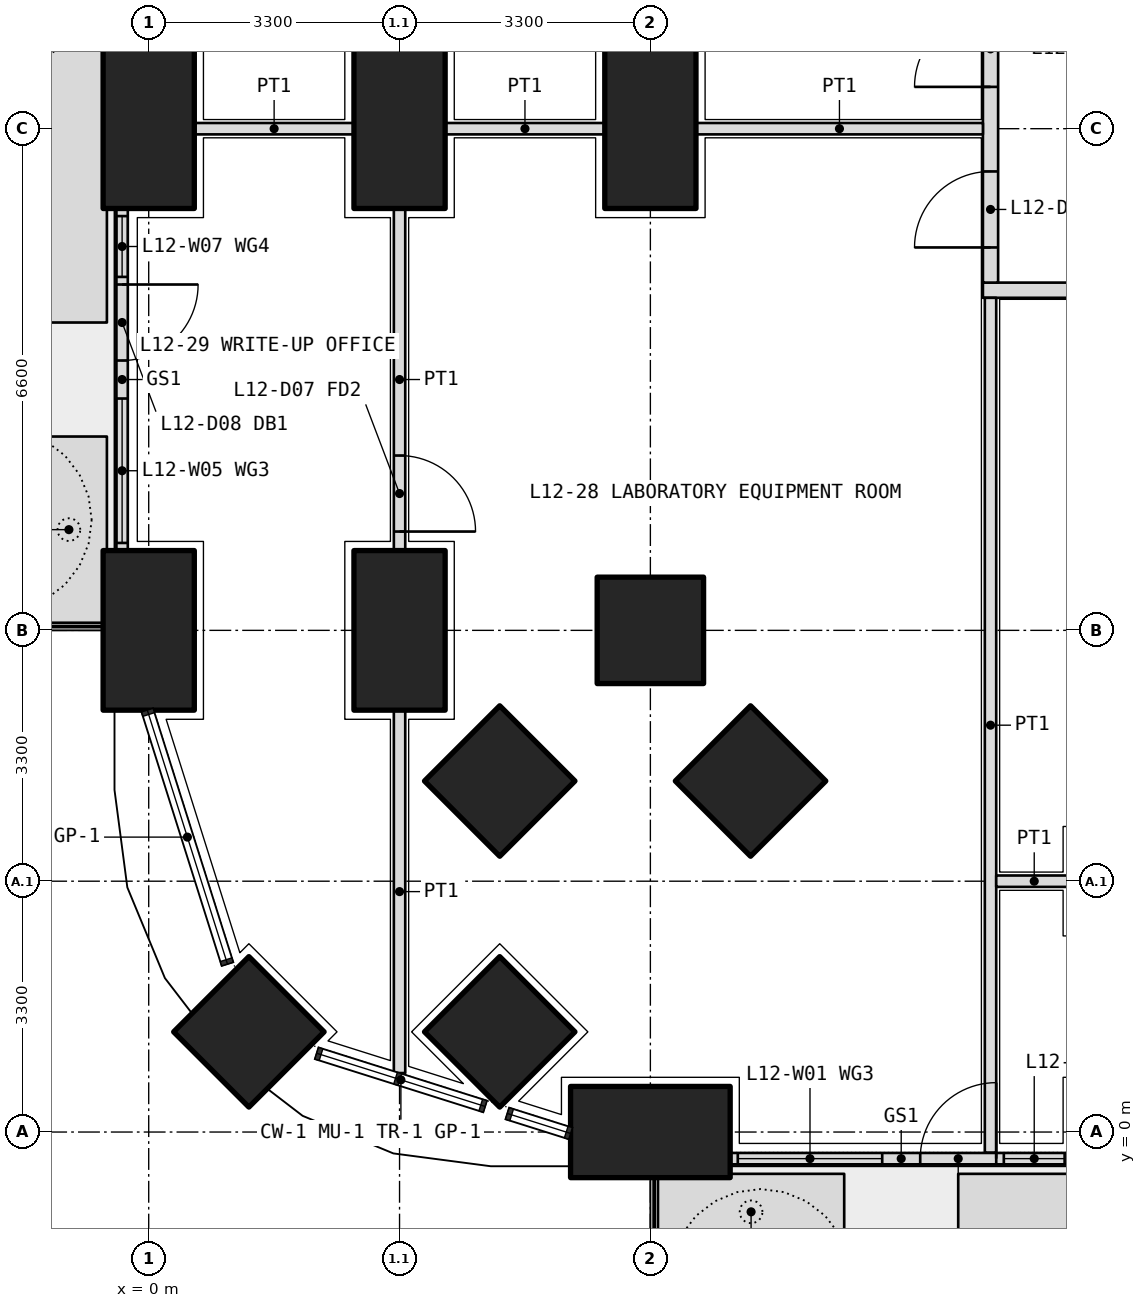
"""IFC4 building model, lengths in metres.
Left out: names, types, materials, properties, quantities, classifications, styles, units other than length and angle.
Written with IfcOpenShell. Run it as: python <this file> out.ifc"""

import sys

from ifc_helpers import new_model, si_unit, direction, frame, frame_2d, origin, origin_2d, place, context, subcontext, project, spatial, polyline, rectangle, outline, extrude, element, fill, save


model = new_model("IFC4")
c1 = context("Model", 3, precision=1e-05, world=origin(), true_north=direction((0.0, 1.0)))
c2 = subcontext(c1, "Body", "Model", "MODEL_VIEW")
j1 = project(units=[si_unit("LENGTHUNIT", "METRE"), si_unit("PLANEANGLEUNIT", "RADIAN")], contexts=[c1])
p1 = place(None, origin())
s1 = spatial("IfcSite", under=j1, at=p1, CompositionType="ELEMENT")
p2 = place(p1, origin())
s2 = spatial("IfcBuilding", under=s1, at=p2, CompositionType="ELEMENT")
p3 = place(p2, frame((0.0, 0.0, 54.9)))
s3 = spatial("IfcBuildingStorey", under=s2, at=p3, CompositionType="ELEMENT", Elevation=54.9)
p4 = place(p3, frame((1.318, 1.318, 0.0), z_axis=(0.0, 0.0, 1.0), x_axis=(0.707106781187, 0.707106781187, 0.0)))
e1 = element("IfcColumn", 1, at=p4, inside=s3, PredefinedType="COLUMN", context=c2, shape_type="SweptSolid", body=[
    extrude(rectangle(XDim=1.4, YDim=1.4, at=origin_2d()), origin(), (0.0, 0.0, 1.0), 4.2),
])
for number, where, z_axis, x_axis in (
    (2, (6.6, 0.0, 0.0), (0.0, 0.0, 1.0), (1.0, 0.0, 0.0)),
    (3, (0.0, 6.6, 0.0), (0.0, 0.0, 1.0), (0.0, 1.0, 0.0)),
    (4, (0.0, 13.2, 0.0), (0.0, 0.0, 1.0), (0.0, 1.0, 0.0)),
):
    element("IfcColumn", number, at=place(p3, frame(where, z_axis=z_axis, x_axis=x_axis)), inside=s3, PredefinedType="COLUMN", context=c2, shape_type="SweptSolid", body=[
        extrude(rectangle(XDim=2.1, YDim=1.2, at=origin_2d()), origin(), (0.0, 0.0, 1.0), 4.2),
    ])
for number, where, z_axis, x_axis in (
    (5, (6.6, 6.6, 0.0), (0.0, 0.0, 1.0), (1.0, 0.0, 0.0)),
    (6, (4.618, 1.318, 0.0), (0.0, 0.0, 1.0), (0.707, 0.707, 0.0)),
):
    element("IfcColumn", number, at=place(p3, frame(where, z_axis=z_axis, x_axis=x_axis)), inside=s3, PredefinedType="COLUMN", context=c2, shape_type="SweptSolid", body=[
        extrude(rectangle(XDim=1.4, YDim=1.4, at=origin_2d()), origin(), (0.0, 0.0, 1.0), 4.2),
    ])
for number, where, z_axis, x_axis in (
    (7, (3.3, 6.6, 0.0), (0.0, 0.0, 1.0), (0.0, 1.0, 0.0)),
    (8, (3.3, 13.2, 0.0), (0.0, 0.0, 1.0), (0.0, 1.0, 0.0)),
):
    element("IfcColumn", number, at=place(p3, frame(where, z_axis=z_axis, x_axis=x_axis)), inside=s3, PredefinedType="COLUMN", context=c2, shape_type="SweptSolid", body=[
        extrude(rectangle(XDim=2.1, YDim=1.2, at=origin_2d()), origin(), (0.0, 0.0, 1.0), 4.2),
    ])
for number, where, z_axis, x_axis in (
    (9, (4.618, 4.618, 0.0), (0.0, 0.0, 1.0), (0.707, 0.707, 0.0)),
    (10, (7.918, 4.618, 0.0), (0.0, 0.0, 1.0), (0.707, 0.707, 0.0)),
):
    element("IfcColumn", number, at=place(p3, frame(where, z_axis=z_axis, x_axis=x_axis)), inside=s3, PredefinedType="COLUMN", context=c2, shape_type="SweptSolid", body=[
        extrude(rectangle(XDim=1.4, YDim=1.4, at=origin_2d()), origin(), (0.0, 0.0, 1.0), 4.2),
    ])
p5 = place(p3, frame((6.6, 13.2, 0.0), z_axis=(0.0, 0.0, 1.0), x_axis=(0.0, 1.0, 0.0)))
e11 = element("IfcColumn", 11, at=p5, inside=s3, PredefinedType="COLUMN", context=c2, shape_type="SweptSolid", body=[
    extrude(rectangle(XDim=2.1, YDim=1.2, at=origin_2d()), origin(), (0.0, 0.0, 1.0), 4.2),
])
p6 = place(p3, origin())
e12 = element("IfcWall", 12, at=p6, inside=s3, PredefinedType="USERDEFINED", context=c2, shape_type="SweptSolid", body=[
    extrude(outline(polyline([(6.7, -1.55), (9.15, -1.55), (9.15, -0.55), (6.7, -0.55), (6.7, -1.55)]), holes=[polyline([(6.85, -1.4), (9.0, -1.4), (9.0, -0.7), (6.85, -0.7), (6.85, -1.4)])]), origin(), (0.0, 0.0, 1.0), 1.05),
])
p7 = place(p3, origin())
e13 = element("IfcWall", 13, at=p7, inside=s3, PredefinedType="USERDEFINED", context=c2, shape_type="SweptSolid", body=[
    extrude(outline(polyline([(10.65, -1.55), (19.7, -1.55), (19.7, -0.55), (10.65, -0.55), (10.65, -1.55)]), holes=[polyline([(10.8, -1.4), (19.55, -1.4), (19.55, -0.7), (10.8, -0.7), (10.8, -1.4)])]), origin(), (0.0, 0.0, 1.0), 1.05),
])
p8 = place(p3, origin())
e14 = element("IfcWall", 14, at=p8, inside=s3, PredefinedType="USERDEFINED", context=c2, shape_type="SweptSolid", body=[
    extrude(outline(polyline([(-1.55, 6.7), (-0.55, 6.7), (-0.55, 9.15), (-1.55, 9.15), (-1.55, 6.7)]), holes=[polyline([(-1.4, 6.85), (-0.7, 6.85), (-0.7, 9.0), (-1.4, 9.0), (-1.4, 6.85)])]), origin(), (0.0, 0.0, 1.0), 1.05),
])
p9 = place(p3, origin())
e15 = element("IfcWall", 15, at=p9, inside=s3, PredefinedType="USERDEFINED", context=c2, shape_type="SweptSolid", body=[
    extrude(outline(polyline([(-1.55, 10.65), (-0.55, 10.65), (-0.55, 19.7), (-1.55, 19.7), (-1.55, 10.65)]), holes=[polyline([(-1.4, 10.8), (-0.7, 10.8), (-0.7, 19.55), (-1.4, 19.55), (-1.4, 10.8)])]), origin(), (0.0, 0.0, 1.0), 1.05),
])
p10 = place(p3, frame((7.65, -0.35, 0.0), z_axis=(0.0, 0.0, 1.0), x_axis=(1.0, 0.0, 0.0)))
e16 = element("IfcWall", 16, at=p10, inside=s3, PredefinedType="SOLIDWALL", context=c2, shape_type="SweptSolid", body=[
    extrude(rectangle(XDim=4.5, YDim=0.15, at=frame_2d((2.25, 0.0))), origin(), (0.0, 0.0, 1.0), 2.7),
])
p11 = place(p10, frame((2.5, 0.0, 0.0)))
e17 = element("IfcOpeningElement", 17, at=p11, cuts=e16, PredefinedType="OPENING", context=c2, shape_type="SweptSolid", body=[
    extrude(rectangle(XDim=1.0, YDim=2.4, at=frame_2d((0.5, 1.2))), frame((0.0, 0.085, 0.0), z_axis=(0.0, -1.0, 0.0), x_axis=(1.0, 0.0, 0.0)), (0.0, 0.0, 1.0), 0.17),
])
p12 = place(p10, frame((0.1, 0.0, 0.1)))
e18 = element("IfcOpeningElement", 18, at=p12, cuts=e16, PredefinedType="OPENING", context=c2, shape_type="SweptSolid", body=[
    extrude(rectangle(XDim=1.9, YDim=2.3, at=frame_2d((0.95, 1.15))), frame((0.0, 0.085, 0.0), z_axis=(0.0, -1.0, 0.0), x_axis=(1.0, 0.0, 0.0)), (0.0, 0.0, 1.0), 0.17),
])
p13 = place(p10, frame((3.6, 0.0, 0.1)))
e19 = element("IfcOpeningElement", 19, at=p13, cuts=e16, PredefinedType="OPENING", context=c2, shape_type="SweptSolid", body=[
    extrude(rectangle(XDim=0.8, YDim=2.3, at=frame_2d((0.4, 1.15))), frame((0.0, 0.085, 0.0), z_axis=(0.0, -1.0, 0.0), x_axis=(1.0, 0.0, 0.0)), (0.0, 0.0, 1.0), 0.17),
])
p14 = place(p3, frame((-0.35, 12.15, 0.0), z_axis=(0.0, 0.0, 1.0), x_axis=(0.0, -1.0, 0.0)))
e20 = element("IfcWall", 20, at=p14, inside=s3, PredefinedType="SOLIDWALL", context=c2, shape_type="SweptSolid", body=[
    extrude(rectangle(XDim=4.5, YDim=0.15, at=frame_2d((2.25, 0.0))), origin(), (0.0, 0.0, 1.0), 2.7),
])
p15 = place(p14, frame((1.0, 0.0, 0.0)))
e21 = element("IfcOpeningElement", 21, at=p15, cuts=e20, PredefinedType="OPENING", context=c2, shape_type="SweptSolid", body=[
    extrude(rectangle(XDim=1.0, YDim=2.4, at=frame_2d((0.5, 1.2))), frame((0.0, 0.085, 0.0), z_axis=(0.0, -1.0, 0.0), x_axis=(1.0, 0.0, 0.0)), (0.0, 0.0, 1.0), 0.17),
])
p16 = place(p14, frame((0.1, 0.0, 0.1)))
e22 = element("IfcOpeningElement", 22, at=p16, cuts=e20, PredefinedType="OPENING", context=c2, shape_type="SweptSolid", body=[
    extrude(rectangle(XDim=0.8, YDim=2.3, at=frame_2d((0.4, 1.15))), frame((0.0, 0.085, 0.0), z_axis=(0.0, -1.0, 0.0), x_axis=(1.0, 0.0, 0.0)), (0.0, 0.0, 1.0), 0.17),
])
p17 = place(p14, frame((2.5, 0.0, 0.1)))
e23 = element("IfcOpeningElement", 23, at=p17, cuts=e20, PredefinedType="OPENING", context=c2, shape_type="SweptSolid", body=[
    extrude(rectangle(XDim=1.9, YDim=2.3, at=frame_2d((0.95, 1.15))), frame((0.0, 0.085, 0.0), z_axis=(0.0, -1.0, 0.0), x_axis=(1.0, 0.0, 0.0)), (0.0, 0.0, 1.0), 0.17),
])
p18 = place(p3, frame((10.975, 11.075, 0.0), z_axis=(0.0, 0.0, 1.0), x_axis=(1.0, 0.0, 0.0)))
e24 = element("IfcWall", 24, at=p18, inside=s3, PredefinedType="PARTITIONING", context=c2, shape_type="SweptSolid", body=[
    extrude(rectangle(XDim=12.125, YDim=0.2, at=frame_2d((6.062, 0.0))), origin(), (0.0, 0.0, 1.0), 2.85),
])
p19 = place(p18, frame((5.613, 0.0, 0.0)))
e25 = element("IfcOpeningElement", 25, at=p19, cuts=e24, PredefinedType="OPENING", context=c2, shape_type="SweptSolid", body=[
    extrude(rectangle(XDim=1.0, YDim=2.1, at=frame_2d((0.5, 1.05))), frame((0.0, 0.11, 0.0), z_axis=(0.0, -1.0, 0.0), x_axis=(1.0, 0.0, 0.0)), (0.0, 0.0, 1.0), 0.22),
])
p20 = place(p3, frame((11.075, 11.175, 0.0), z_axis=(0.0, 0.0, 1.0), x_axis=(0.0, 1.0, 0.0)))
e26 = element("IfcWall", 26, at=p20, inside=s3, PredefinedType="PARTITIONING", context=c2, shape_type="SweptSolid", body=[
    extrude(rectangle(XDim=23.85, YDim=0.2, at=frame_2d((11.925, 0.0))), origin(), (0.0, 0.0, 1.0), 2.85),
])
p21 = place(p20, frame((0.462, 0.0, 0.0)))
e27 = element("IfcOpeningElement", 27, at=p21, cuts=e26, PredefinedType="OPENING", context=c2, shape_type="SweptSolid", body=[
    extrude(rectangle(XDim=1.0, YDim=2.1, at=frame_2d((0.5, 1.05))), frame((0.0, 0.11, 0.0), z_axis=(0.0, -1.0, 0.0), x_axis=(1.0, 0.0, 0.0)), (0.0, 0.0, 1.0), 0.22),
])
p22 = place(p20, frame((2.575, 0.0, 0.0)))
e28 = element("IfcOpeningElement", 28, at=p22, cuts=e26, PredefinedType="OPENING", context=c2, shape_type="SweptSolid", body=[
    extrude(rectangle(XDim=1.0, YDim=2.1, at=frame_2d((0.5, 1.05))), frame((0.0, 0.11, 0.0), z_axis=(0.0, -1.0, 0.0), x_axis=(1.0, 0.0, 0.0)), (0.0, 0.0, 1.0), 0.22),
])
p23 = place(p20, frame((5.625, 0.0, 0.0)))
e29 = element("IfcOpeningElement", 29, at=p23, cuts=e26, PredefinedType="OPENING", context=c2, shape_type="SweptSolid", body=[
    extrude(rectangle(XDim=0.9, YDim=2.1, at=frame_2d((0.45, 1.05))), frame((0.0, 0.11, 0.0), z_axis=(0.0, -1.0, 0.0), x_axis=(1.0, 0.0, 0.0)), (0.0, 0.0, 1.0), 0.22),
])
p24 = place(p20, frame((9.425, 0.0, 0.0)))
e30 = element("IfcOpeningElement", 30, at=p24, cuts=e26, PredefinedType="OPENING", context=c2, shape_type="SweptSolid", body=[
    extrude(rectangle(XDim=0.9, YDim=2.1, at=frame_2d((0.45, 1.05))), frame((0.0, 0.11, 0.0), z_axis=(0.0, -1.0, 0.0), x_axis=(1.0, 0.0, 0.0)), (0.0, 0.0, 1.0), 0.22),
])
p25 = place(p20, frame((12.975, 0.0, 0.0)))
e31 = element("IfcOpeningElement", 31, at=p25, cuts=e26, PredefinedType="OPENING", context=c2, shape_type="SweptSolid", body=[
    extrude(rectangle(XDim=1.0, YDim=2.1, at=frame_2d((0.5, 1.05))), frame((0.0, 0.11, 0.0), z_axis=(0.0, -1.0, 0.0), x_axis=(1.0, 0.0, 0.0)), (0.0, 0.0, 1.0), 0.22),
])
p26 = place(p20, frame((18.025, 0.0, 0.0)))
e32 = element("IfcOpeningElement", 32, at=p26, cuts=e26, PredefinedType="OPENING", context=c2, shape_type="SweptSolid", body=[
    extrude(rectangle(XDim=1.0, YDim=2.1, at=frame_2d((0.5, 1.05))), frame((0.0, 0.11, 0.0), z_axis=(0.0, -1.0, 0.0), x_axis=(1.0, 0.0, 0.0)), (0.0, 0.0, 1.0), 0.22),
])
p27 = place(p20, frame((22.387, 0.0, 0.0)))
e33 = element("IfcOpeningElement", 33, at=p27, cuts=e26, PredefinedType="OPENING", context=c2, shape_type="SweptSolid", body=[
    extrude(rectangle(XDim=1.0, YDim=2.1, at=frame_2d((0.5, 1.05))), frame((0.0, 0.11, 0.0), z_axis=(0.0, -1.0, 0.0), x_axis=(1.0, 0.0, 0.0)), (0.0, 0.0, 1.0), 0.22),
])
p28 = place(p3, frame((11.075, -0.27, 0.0), z_axis=(0.0, 0.0, 1.0), x_axis=(0.0, 1.0, 0.0)))
e34 = element("IfcWall", 34, at=p28, inside=s3, PredefinedType="PARTITIONING", context=c2, shape_type="SweptSolid", body=[
    extrude(rectangle(XDim=11.245, YDim=0.15, at=frame_2d((5.623, 0.0))), origin(), (0.0, 0.0, 1.0), 2.7),
])
p29 = place(p3, frame((11.15, 3.3, 0.0), z_axis=(0.0, 0.0, 1.0), x_axis=(1.0, 0.0, 0.0)))
e35 = element("IfcWall", 35, at=p29, inside=s3, PredefinedType="PARTITIONING", context=c2, shape_type="SweptSolid", body=[
    extrude(rectangle(XDim=1.0, YDim=0.15, at=frame_2d((0.5, 0.0))), origin(), (0.0, 0.0, 1.0), 3.9),
])
p30 = place(p3, frame((3.3, 12.15, 0.0), z_axis=(0.0, 0.0, 1.0), x_axis=(0.0, -1.0, 0.0)))
e36 = element("IfcWall", 36, at=p30, inside=s3, PredefinedType="PARTITIONING", context=c2, shape_type="SweptSolid", body=[
    extrude(rectangle(XDim=4.5, YDim=0.15, at=frame_2d((2.25, 0.0))), origin(), (0.0, 0.0, 1.0), 3.9),
])
p31 = place(p30, frame((3.25, 0.0, 0.0)))
e37 = element("IfcOpeningElement", 37, at=p31, cuts=e36, PredefinedType="OPENING", context=c2, shape_type="SweptSolid", body=[
    extrude(rectangle(XDim=1.0, YDim=2.1, at=frame_2d((0.5, 1.05))), frame((0.0, 0.085, 0.0), z_axis=(0.0, -1.0, 0.0), x_axis=(1.0, 0.0, 0.0)), (0.0, 0.0, 1.0), 0.17),
])
p32 = place(p3, frame((3.3, 5.55, 0.0), z_axis=(0.0, 0.0, 1.0), x_axis=(0.0, -1.0, 0.0)))
e38 = element("IfcWall", 38, at=p32, inside=s3, PredefinedType="PARTITIONING", context=c2, shape_type="SweptSolid", body=[
    extrude(rectangle(XDim=4.774, YDim=0.15, at=frame_2d((2.387, 0.0))), origin(), (0.0, 0.0, 1.0), 2.7),
])
p33 = place(p3, frame((0.6, 13.2, 0.0), z_axis=(0.0, 0.0, 1.0), x_axis=(1.0, 0.0, 0.0)))
e39 = element("IfcWall", 39, at=p33, inside=s3, PredefinedType="PARTITIONING", context=c2, shape_type="SweptSolid", body=[
    extrude(rectangle(XDim=2.1, YDim=0.15, at=frame_2d((1.05, 0.0))), origin(), (0.0, 0.0, 1.0), 2.85),
])
p34 = place(p3, frame((3.9, 13.2, 0.0), z_axis=(0.0, 0.0, 1.0), x_axis=(1.0, 0.0, 0.0)))
e40 = element("IfcWall", 40, at=p34, inside=s3, PredefinedType="PARTITIONING", context=c2, shape_type="SweptSolid", body=[
    extrude(rectangle(XDim=2.1, YDim=0.15, at=frame_2d((1.05, 0.0))), origin(), (0.0, 0.0, 1.0), 2.85),
])
p35 = place(p3, frame((7.2, 13.2, 0.0), z_axis=(0.0, 0.0, 1.0), x_axis=(1.0, 0.0, 0.0)))
e41 = element("IfcWall", 41, at=p35, inside=s3, PredefinedType="PARTITIONING", context=c2, shape_type="SweptSolid", body=[
    extrude(rectangle(XDim=3.775, YDim=0.15, at=frame_2d((1.888, 0.0))), origin(), (0.0, 0.0, 1.0), 2.85),
])
p36 = place(p11, origin())
e42 = element("IfcDoor", 42, at=p36, inside=s3, OperationType="SINGLE_SWING_RIGHT", PredefinedType="DOOR", context=c2, shape_type="SweptSolid", body=[
    extrude(rectangle(XDim=1.0, YDim=2.4, at=frame_2d((0.5, 1.2))), frame((0.0, 0.025, 0.0), z_axis=(0.0, -1.0, 0.0), x_axis=(1.0, 0.0, 0.0)), (0.0, 0.0, 1.0), 0.05),
])
fill(e17, e42)
p37 = place(p12, origin())
e43 = element("IfcWindow", 43, at=p37, inside=s3, PartitioningType="SINGLE_PANEL", PredefinedType="WINDOW", context=c2, shape_type="SweptSolid", body=[
    extrude(rectangle(XDim=1.9, YDim=2.3, at=frame_2d((0.95, 1.15))), frame((0.0, 0.03, 0.0), z_axis=(0.0, -1.0, 0.0), x_axis=(1.0, 0.0, 0.0)), (0.0, 0.0, 1.0), 0.06),
])
fill(e18, e43)
p38 = place(p13, origin())
e44 = element("IfcWindow", 44, at=p38, inside=s3, PartitioningType="SINGLE_PANEL", PredefinedType="WINDOW", context=c2, shape_type="SweptSolid", body=[
    extrude(rectangle(XDim=0.8, YDim=2.3, at=frame_2d((0.4, 1.15))), frame((0.0, 0.03, 0.0), z_axis=(0.0, -1.0, 0.0), x_axis=(1.0, 0.0, 0.0)), (0.0, 0.0, 1.0), 0.06),
])
fill(e19, e44)
p39 = place(p15, origin())
e45 = element("IfcDoor", 45, at=p39, inside=s3, OperationType="SINGLE_SWING_LEFT", PredefinedType="DOOR", context=c2, shape_type="SweptSolid", body=[
    extrude(rectangle(XDim=1.0, YDim=2.4, at=frame_2d((0.5, 1.2))), frame((0.0, 0.025, 0.0), z_axis=(0.0, -1.0, 0.0), x_axis=(1.0, 0.0, 0.0)), (0.0, 0.0, 1.0), 0.05),
])
fill(e21, e45)
p40 = place(p16, origin())
e46 = element("IfcWindow", 46, at=p40, inside=s3, PartitioningType="SINGLE_PANEL", PredefinedType="WINDOW", context=c2, shape_type="SweptSolid", body=[
    extrude(rectangle(XDim=0.8, YDim=2.3, at=frame_2d((0.4, 1.15))), frame((0.0, 0.03, 0.0), z_axis=(0.0, -1.0, 0.0), x_axis=(1.0, 0.0, 0.0)), (0.0, 0.0, 1.0), 0.06),
])
fill(e22, e46)
p41 = place(p17, origin())
e47 = element("IfcWindow", 47, at=p41, inside=s3, PartitioningType="SINGLE_PANEL", PredefinedType="WINDOW", context=c2, shape_type="SweptSolid", body=[
    extrude(rectangle(XDim=1.9, YDim=2.3, at=frame_2d((0.95, 1.15))), frame((0.0, 0.03, 0.0), z_axis=(0.0, -1.0, 0.0), x_axis=(1.0, 0.0, 0.0)), (0.0, 0.0, 1.0), 0.06),
])
fill(e23, e47)
p42 = place(p21, origin())
e48 = element("IfcDoor", 48, at=p42, inside=s3, OperationType="SINGLE_SWING_LEFT", PredefinedType="DOOR", context=c2, shape_type="SweptSolid", body=[
    extrude(rectangle(XDim=1.0, YDim=2.1, at=frame_2d((0.5, 1.05))), frame((0.0, 0.025, 0.0), z_axis=(0.0, -1.0, 0.0), x_axis=(1.0, 0.0, 0.0)), (0.0, 0.0, 1.0), 0.05),
])
fill(e27, e48)
p43 = place(p31, origin())
e49 = element("IfcDoor", 49, at=p43, inside=s3, OperationType="SINGLE_SWING_RIGHT", PredefinedType="DOOR", context=c2, shape_type="SweptSolid", body=[
    extrude(rectangle(XDim=1.0, YDim=2.1, at=frame_2d((0.5, 1.05))), frame((0.0, 0.025, 0.0), z_axis=(0.0, -1.0, 0.0), x_axis=(1.0, 0.0, 0.0)), (0.0, 0.0, 1.0), 0.05),
])
fill(e37, e49)
p44 = place(p22, origin())
e50 = element("IfcDoor", 50, at=p44, inside=s3, OperationType="SINGLE_SWING_LEFT", PredefinedType="DOOR", context=c2, shape_type="SweptSolid", body=[
    extrude(rectangle(XDim=1.0, YDim=2.1, at=frame_2d((0.5, 1.05))), frame((0.0, 0.025, 0.0), z_axis=(0.0, -1.0, 0.0), x_axis=(1.0, 0.0, 0.0)), (0.0, 0.0, 1.0), 0.05),
])
fill(e28, e50)
save(model, sys.argv[1])
